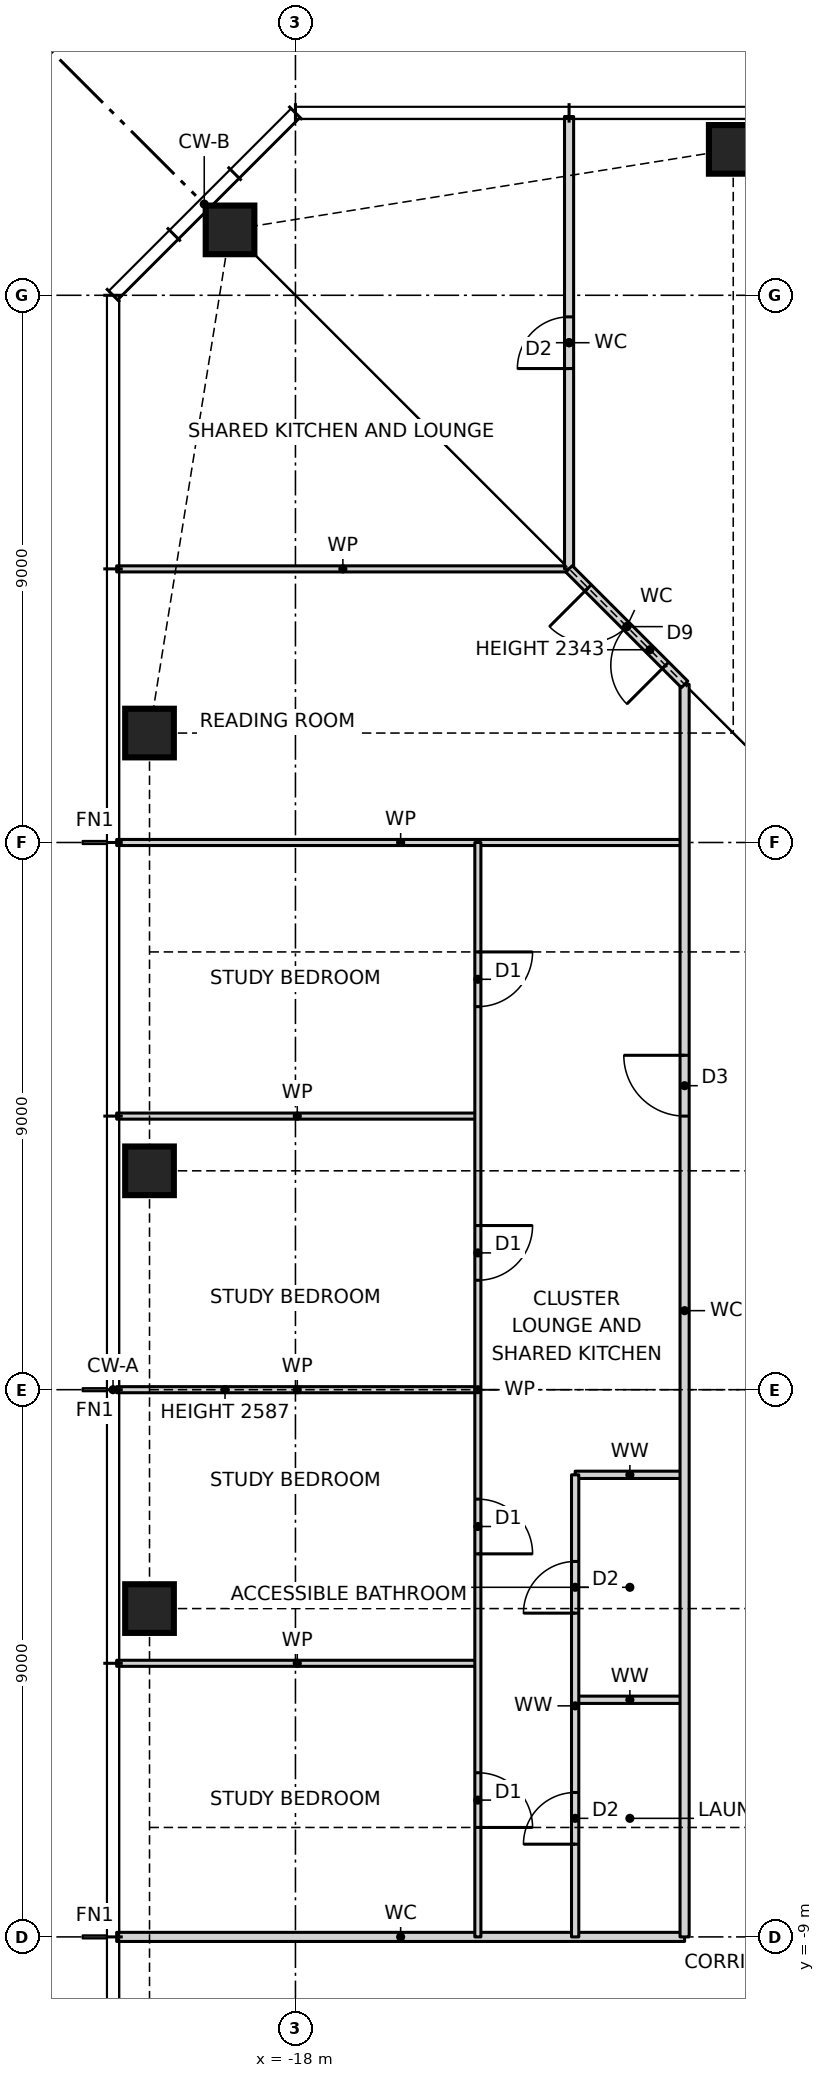
"""IFC4 building model, lengths in metres.
Left out: names, types, materials, properties, quantities, classifications, styles, units other than length and angle.
Written with IfcOpenShell. Run it as: python <this file> out.ifc"""

import sys

from ifc_helpers import new_model, si_unit, direction, frame, frame_2d, origin, origin_2d, place, context, subcontext, project, spatial, rectangle, hollow_rectangle, extrude, element, fill, save


model = new_model("IFC4")
c1 = context("Model", 3, precision=1e-05, world=origin(), true_north=direction((0.0, 1.0)))
c2 = subcontext(c1, "Body", "Model", "MODEL_VIEW")
j1 = project(units=[si_unit("LENGTHUNIT", "METRE"), si_unit("PLANEANGLEUNIT", "RADIAN")], contexts=[c1])
p1 = place(None, origin())
s1 = spatial("IfcSite", under=j1, at=p1, CompositionType="ELEMENT")
p2 = place(p1, origin())
s2 = spatial("IfcBuilding", under=s1, at=p2, CompositionType="ELEMENT")
p3 = place(p2, frame((0.0, 0.0, 133.0)))
s3 = spatial("IfcBuildingStorey", under=s2, at=p3, CompositionType="ELEMENT", Elevation=133.0)
for number, where, z_axis, x_axis in (
    (1, (-10.8, 20.4, 0.0), (0.0, 0.0, 1.0), (1.0, 0.0, 0.0)),
    (2, (-19.076, 19.076, 0.0), (0.0, 0.0, 1.0), (1.0, 0.0, 0.0)),
    (3, (-20.4, 10.8, 0.0), (0.0, 0.0, 1.0), (1.0, 0.0, 0.0)),
    (4, (-20.4, 3.6, 0.0), (0.0, 0.0, 1.0), (1.0, 0.0, 0.0)),
    (5, (-20.4, -3.6, 0.0), (0.0, 0.0, 1.0), (1.0, 0.0, 0.0)),
):
    element("IfcColumn", number, at=place(p3, frame(where, z_axis=z_axis, x_axis=x_axis)), inside=s3, PredefinedType="COLUMN", context=c2, shape_type="SweptSolid", body=[
        extrude(hollow_rectangle(XDim=0.8, YDim=0.8, WallThickness=0.07, at=origin_2d()), origin(), (0.0, 0.0, 1.0), 3.5),
    ])
p4 = place(p3, frame((-20.94, -9.0, 0.0), z_axis=(0.0, 0.0, 1.0), x_axis=(1.0, 0.0, 0.0)))
e6 = element("IfcWall", 6, at=p4, inside=s3, PredefinedType="PARTITIONING", context=c2, shape_type="SweptSolid", body=[
    extrude(rectangle(XDim=9.34, YDim=0.15, at=frame_2d((4.67, 0.0))), origin(), (0.0, 0.0, 1.0), 3.27),
])
p5 = place(p3, frame((-13.4, -5.1, 0.0), z_axis=(0.0, 0.0, 1.0), x_axis=(1.0, 0.0, 0.0)))
e7 = element("IfcWall", 7, at=p5, inside=s3, PredefinedType="PARTITIONING", context=c2, shape_type="SweptSolid", body=[
    extrude(rectangle(XDim=1.8, YDim=0.12, at=frame_2d((0.9, 0.0))), origin(), (0.0, 0.0, 1.0), 3.27),
])
p6 = place(p3, frame((-20.94, -4.5, 0.0), z_axis=(0.0, 0.0, 1.0), x_axis=(1.0, 0.0, 0.0)))
e8 = element("IfcWall", 8, at=p6, inside=s3, PredefinedType="PARTITIONING", context=c2, shape_type="SweptSolid", body=[
    extrude(rectangle(XDim=5.94, YDim=0.1, at=frame_2d((2.97, 0.0))), origin(), (0.0, 0.0, 1.0), 3.27),
])
p7 = place(p3, frame((-13.4, -1.4, 0.0), z_axis=(0.0, 0.0, 1.0), x_axis=(1.0, 0.0, 0.0)))
e9 = element("IfcWall", 9, at=p7, inside=s3, PredefinedType="PARTITIONING", context=c2, shape_type="SweptSolid", body=[
    extrude(rectangle(XDim=1.8, YDim=0.12, at=frame_2d((0.9, 0.0))), origin(), (0.0, 0.0, 1.0), 3.27),
])
p8 = place(p3, frame((-20.94, 0.0, 0.0), z_axis=(0.0, 0.0, 1.0), x_axis=(1.0, 0.0, 0.0)))
e10 = element("IfcWall", 10, at=p8, inside=s3, PredefinedType="PARTITIONING", context=c2, shape_type="SweptSolid", body=[
    extrude(rectangle(XDim=5.94, YDim=0.1, at=frame_2d((2.97, 0.0))), origin(), (0.0, 0.0, 1.0), 2.587),
])
p9 = place(p3, frame((-20.94, 4.5, 0.0), z_axis=(0.0, 0.0, 1.0), x_axis=(1.0, 0.0, 0.0)))
e11 = element("IfcWall", 11, at=p9, inside=s3, PredefinedType="PARTITIONING", context=c2, shape_type="SweptSolid", body=[
    extrude(rectangle(XDim=5.94, YDim=0.1, at=frame_2d((2.97, 0.0))), origin(), (0.0, 0.0, 1.0), 3.27),
])
p10 = place(p3, frame((-20.94, 9.0, 0.0), z_axis=(0.0, 0.0, 1.0), x_axis=(1.0, 0.0, 0.0)))
e12 = element("IfcWall", 12, at=p10, inside=s3, PredefinedType="PARTITIONING", context=c2, shape_type="SweptSolid", body=[
    extrude(rectangle(XDim=9.34, YDim=0.1, at=frame_2d((4.67, 0.0))), origin(), (0.0, 0.0, 1.0), 3.27),
])
p11 = place(p3, frame((-20.94, 13.5, 0.0), z_axis=(0.0, 0.0, 1.0), x_axis=(1.0, 0.0, 0.0)))
e13 = element("IfcWall", 13, at=p11, inside=s3, PredefinedType="PARTITIONING", context=c2, shape_type="SweptSolid", body=[
    extrude(rectangle(XDim=7.44, YDim=0.1, at=frame_2d((3.72, 0.0))), origin(), (0.0, 0.0, 1.0), 3.27),
])
p12 = place(p3, frame((-11.6, -9.0, 0.0), z_axis=(0.0, 0.0, 1.0), x_axis=(0.0, 1.0, 0.0)))
e14 = element("IfcWall", 14, at=p12, inside=s3, PredefinedType="PARTITIONING", context=c2, shape_type="SweptSolid", body=[
    extrude(rectangle(XDim=20.6, YDim=0.15, at=frame_2d((10.3, 0.0))), origin(), (0.0, 0.0, 1.0), 3.27),
])
p13 = place(p12, frame((13.5, 0.0, 0.0)))
e15 = element("IfcOpeningElement", 15, at=p13, cuts=e14, PredefinedType="OPENING", context=c2, shape_type="SweptSolid", body=[
    extrude(rectangle(XDim=1.0, YDim=2.1, at=frame_2d((0.5, 1.05))), frame((0.0, 0.085, 0.0), z_axis=(0.0, -1.0, 0.0), x_axis=(1.0, 0.0, 0.0)), (0.0, 0.0, 1.0), 0.17),
])
p14 = place(p3, frame((-13.4, -9.0, 0.0), z_axis=(0.0, 0.0, 1.0), x_axis=(0.0, 1.0, 0.0)))
e16 = element("IfcWall", 16, at=p14, inside=s3, PredefinedType="PARTITIONING", context=c2, shape_type="SweptSolid", body=[
    extrude(rectangle(XDim=7.6, YDim=0.12, at=frame_2d((3.8, 0.0))), origin(), (0.0, 0.0, 1.0), 3.27),
])
p15 = place(p14, frame((5.325, 0.0, 0.0)))
e17 = element("IfcOpeningElement", 17, at=p15, cuts=e16, PredefinedType="OPENING", context=c2, shape_type="SweptSolid", body=[
    extrude(rectangle(XDim=0.85, YDim=2.1, at=frame_2d((0.425, 1.05))), frame((0.0, 0.07, 0.0), z_axis=(0.0, -1.0, 0.0), x_axis=(1.0, 0.0, 0.0)), (0.0, 0.0, 1.0), 0.14),
])
p16 = place(p14, frame((1.525, 0.0, 0.0)))
e18 = element("IfcOpeningElement", 18, at=p16, cuts=e16, PredefinedType="OPENING", context=c2, shape_type="SweptSolid", body=[
    extrude(rectangle(XDim=0.85, YDim=2.1, at=frame_2d((0.425, 1.05))), frame((0.0, 0.07, 0.0), z_axis=(0.0, -1.0, 0.0), x_axis=(1.0, 0.0, 0.0)), (0.0, 0.0, 1.0), 0.14),
])
p17 = place(p3, frame((-13.5, 13.5, 0.0), z_axis=(0.0, 0.0, 1.0), x_axis=(0.0, 1.0, 0.0)))
e19 = element("IfcWall", 19, at=p17, inside=s3, PredefinedType="PARTITIONING", context=c2, shape_type="SweptSolid", body=[
    extrude(rectangle(XDim=7.44, YDim=0.15, at=frame_2d((3.72, 0.0))), origin(), (0.0, 0.0, 1.0), 3.27),
])
p18 = place(p17, frame((3.295, 0.0, 0.0)))
e20 = element("IfcOpeningElement", 20, at=p18, cuts=e19, PredefinedType="OPENING", context=c2, shape_type="SweptSolid", body=[
    extrude(rectangle(XDim=0.85, YDim=2.1, at=frame_2d((0.425, 1.05))), frame((0.0, 0.085, 0.0), z_axis=(0.0, -1.0, 0.0), x_axis=(1.0, 0.0, 0.0)), (0.0, 0.0, 1.0), 0.17),
])
p19 = place(p3, frame((-15.0, -9.0, 0.0), z_axis=(0.0, 0.0, 1.0), x_axis=(0.0, 1.0, 0.0)))
e21 = element("IfcWall", 21, at=p19, inside=s3, PredefinedType="PARTITIONING", context=c2, shape_type="SweptSolid", body=[
    extrude(rectangle(XDim=18.0, YDim=0.1, at=frame_2d((9.0, 0.0))), origin(), (0.0, 0.0, 1.0), 3.27),
])
p20 = place(p19, frame((15.3, 0.0, 0.0)))
e22 = element("IfcOpeningElement", 22, at=p20, cuts=e21, PredefinedType="OPENING", context=c2, shape_type="SweptSolid", body=[
    extrude(rectangle(XDim=0.9, YDim=2.1, at=frame_2d((0.45, 1.05))), frame((0.0, 0.06, 0.0), z_axis=(0.0, -1.0, 0.0), x_axis=(1.0, 0.0, 0.0)), (0.0, 0.0, 1.0), 0.12),
])
p21 = place(p19, frame((10.8, 0.0, 0.0)))
e23 = element("IfcOpeningElement", 23, at=p21, cuts=e21, PredefinedType="OPENING", context=c2, shape_type="SweptSolid", body=[
    extrude(rectangle(XDim=0.9, YDim=2.1, at=frame_2d((0.45, 1.05))), frame((0.0, 0.06, 0.0), z_axis=(0.0, -1.0, 0.0), x_axis=(1.0, 0.0, 0.0)), (0.0, 0.0, 1.0), 0.12),
])
p22 = place(p19, frame((6.3, 0.0, 0.0)))
e24 = element("IfcOpeningElement", 24, at=p22, cuts=e21, PredefinedType="OPENING", context=c2, shape_type="SweptSolid", body=[
    extrude(rectangle(XDim=0.9, YDim=2.1, at=frame_2d((0.45, 1.05))), frame((0.0, 0.06, 0.0), z_axis=(0.0, -1.0, 0.0), x_axis=(1.0, 0.0, 0.0)), (0.0, 0.0, 1.0), 0.12),
])
p23 = place(p19, frame((1.8, 0.0, 0.0)))
e25 = element("IfcOpeningElement", 25, at=p23, cuts=e21, PredefinedType="OPENING", context=c2, shape_type="SweptSolid", body=[
    extrude(rectangle(XDim=0.9, YDim=2.1, at=frame_2d((0.45, 1.05))), frame((0.0, 0.06, 0.0), z_axis=(0.0, -1.0, 0.0), x_axis=(1.0, 0.0, 0.0)), (0.0, 0.0, 1.0), 0.12),
])
p24 = place(p3, frame((-11.6, 11.6, 0.0), z_axis=(0.0, 0.0, 1.0), x_axis=(-0.707106781187, 0.707106781187, 0.0)))
e26 = element("IfcWall", 26, at=p24, inside=s3, PredefinedType="PARTITIONING", context=c2, shape_type="SweptSolid", body=[
    extrude(rectangle(XDim=2.687, YDim=0.15, at=frame_2d((1.343, 0.0))), origin(), (0.0, 0.0, 1.0), 2.343),
])
p25 = place(p24, frame((0.444, 0.0, 0.0)))
e27 = element("IfcOpeningElement", 27, at=p25, cuts=e26, PredefinedType="OPENING", context=c2, shape_type="SweptSolid", body=[
    extrude(rectangle(XDim=1.8, YDim=2.1, at=frame_2d((0.9, 1.05))), frame((0.0, 0.085, 0.0), z_axis=(0.0, -1.0, 0.0), x_axis=(1.0, 0.0, 0.0)), (0.0, 0.0, 1.0), 0.17),
])
p26 = place(p25, origin())
e28 = element("IfcDoor", 28, at=p26, inside=s3, OperationType="DOUBLE_DOOR_SINGLE_SWING", PredefinedType="DOOR", context=c2, shape_type="SweptSolid", body=[
    extrude(rectangle(XDim=1.8, YDim=2.1, at=frame_2d((0.9, 1.05))), frame((0.0, 0.025, 0.0), z_axis=(0.0, -1.0, 0.0), x_axis=(1.0, 0.0, 0.0)), (0.0, 0.0, 1.0), 0.05),
])
fill(e27, e28)
p27 = place(p20, frame((0.9, 0.0, 0.0), z_axis=(0.0, 0.0, 1.0), x_axis=(-1.0, 0.0, 0.0)))
e29 = element("IfcDoor", 29, at=p27, inside=s3, OperationType="SINGLE_SWING_LEFT", PredefinedType="DOOR", context=c2, shape_type="SweptSolid", body=[
    extrude(rectangle(XDim=0.9, YDim=2.1, at=frame_2d((0.45, 1.05))), frame((0.0, 0.025, 0.0), z_axis=(0.0, -1.0, 0.0), x_axis=(1.0, 0.0, 0.0)), (0.0, 0.0, 1.0), 0.05),
])
fill(e22, e29)
p28 = place(p21, frame((0.9, 0.0, 0.0), z_axis=(0.0, 0.0, 1.0), x_axis=(-1.0, 0.0, 0.0)))
e30 = element("IfcDoor", 30, at=p28, inside=s3, OperationType="SINGLE_SWING_LEFT", PredefinedType="DOOR", context=c2, shape_type="SweptSolid", body=[
    extrude(rectangle(XDim=0.9, YDim=2.1, at=frame_2d((0.45, 1.05))), frame((0.0, 0.025, 0.0), z_axis=(0.0, -1.0, 0.0), x_axis=(1.0, 0.0, 0.0)), (0.0, 0.0, 1.0), 0.05),
])
fill(e23, e30)
p29 = place(p22, frame((0.9, 0.0, 0.0), z_axis=(0.0, 0.0, 1.0), x_axis=(-1.0, 0.0, 0.0)))
e31 = element("IfcDoor", 31, at=p29, inside=s3, OperationType="SINGLE_SWING_RIGHT", PredefinedType="DOOR", context=c2, shape_type="SweptSolid", body=[
    extrude(rectangle(XDim=0.9, YDim=2.1, at=frame_2d((0.45, 1.05))), frame((0.0, 0.025, 0.0), z_axis=(0.0, -1.0, 0.0), x_axis=(1.0, 0.0, 0.0)), (0.0, 0.0, 1.0), 0.05),
])
fill(e24, e31)
p30 = place(p23, frame((0.9, 0.0, 0.0), z_axis=(0.0, 0.0, 1.0), x_axis=(-1.0, 0.0, 0.0)))
e32 = element("IfcDoor", 32, at=p30, inside=s3, OperationType="SINGLE_SWING_RIGHT", PredefinedType="DOOR", context=c2, shape_type="SweptSolid", body=[
    extrude(rectangle(XDim=0.9, YDim=2.1, at=frame_2d((0.45, 1.05))), frame((0.0, 0.025, 0.0), z_axis=(0.0, -1.0, 0.0), x_axis=(1.0, 0.0, 0.0)), (0.0, 0.0, 1.0), 0.05),
])
fill(e25, e32)
p31 = place(p13, origin())
e33 = element("IfcDoor", 33, at=p31, inside=s3, OperationType="SINGLE_SWING_RIGHT", PredefinedType="DOOR", context=c2, shape_type="SweptSolid", body=[
    extrude(rectangle(XDim=1.0, YDim=2.1, at=frame_2d((0.5, 1.05))), frame((0.0, 0.025, 0.0), z_axis=(0.0, -1.0, 0.0), x_axis=(1.0, 0.0, 0.0)), (0.0, 0.0, 1.0), 0.05),
])
fill(e15, e33)
p32 = place(p15, origin())
e34 = element("IfcDoor", 34, at=p32, inside=s3, OperationType="SINGLE_SWING_LEFT", PredefinedType="DOOR", context=c2, shape_type="SweptSolid", body=[
    extrude(rectangle(XDim=0.85, YDim=2.1, at=frame_2d((0.425, 1.05))), frame((0.0, 0.025, 0.0), z_axis=(0.0, -1.0, 0.0), x_axis=(1.0, 0.0, 0.0)), (0.0, 0.0, 1.0), 0.05),
])
fill(e17, e34)
p33 = place(p16, origin())
e35 = element("IfcDoor", 35, at=p33, inside=s3, OperationType="SINGLE_SWING_LEFT", PredefinedType="DOOR", context=c2, shape_type="SweptSolid", body=[
    extrude(rectangle(XDim=0.85, YDim=2.1, at=frame_2d((0.425, 1.05))), frame((0.0, 0.025, 0.0), z_axis=(0.0, -1.0, 0.0), x_axis=(1.0, 0.0, 0.0)), (0.0, 0.0, 1.0), 0.05),
])
fill(e18, e35)
p34 = place(p18, origin())
e36 = element("IfcDoor", 36, at=p34, inside=s3, OperationType="SINGLE_SWING_LEFT", PredefinedType="DOOR", context=c2, shape_type="SweptSolid", body=[
    extrude(rectangle(XDim=0.85, YDim=2.1, at=frame_2d((0.425, 1.05))), frame((0.0, 0.025, 0.0), z_axis=(0.0, -1.0, 0.0), x_axis=(1.0, 0.0, 0.0)), (0.0, 0.0, 1.0), 0.05),
])
fill(e20, e36)
save(model, sys.argv[1])
